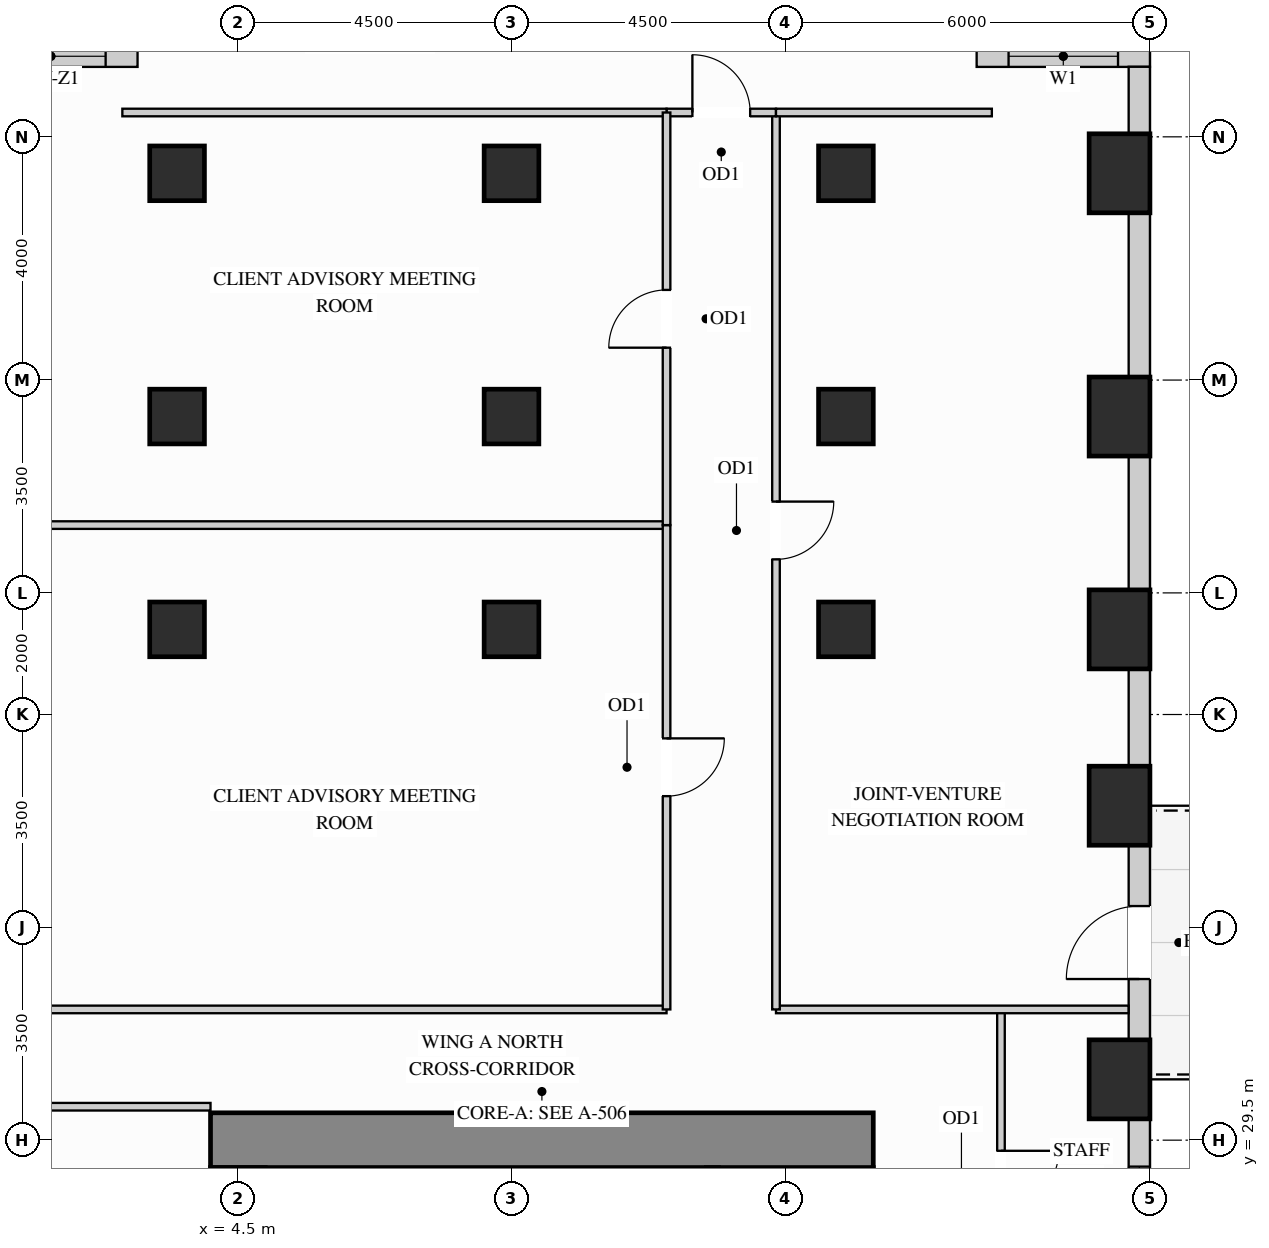
"""IFC4 building model, lengths in metres.
Left out: names, types, materials, properties, quantities, classifications, styles, units other than length and angle.
Written with IfcOpenShell. Run it as: python <this file> out.ifc"""

import sys

from ifc_helpers import new_model, si_unit, direction, frame, frame_2d, origin, origin_2d, place, context, subcontext, project, spatial, rectangle, extrude, source, transform, mapped, element, fill, save


model = new_model("IFC4")
c1 = context("Model", 3, precision=1e-05, world=origin(), true_north=direction((0.0, 1.0)))
c2 = subcontext(c1, "Body", "Model", "MODEL_VIEW")
j1 = project(units=[si_unit("LENGTHUNIT", "METRE"), si_unit("PLANEANGLEUNIT", "RADIAN")], contexts=[c1])
p1 = place(None, origin())
s1 = spatial("IfcSite", under=j1, at=p1, CompositionType="ELEMENT")
p2 = place(p1, origin())
s2 = spatial("IfcBuilding", under=s1, at=p2, CompositionType="ELEMENT")
p3 = place(p2, frame((0.0, 0.0, 40.5)))
s3 = spatial("IfcBuildingStorey", under=s2, at=p3, CompositionType="ELEMENT", Elevation=40.5)
m1 = source(origin(), c2, "Body", "SweptSolid", [
    extrude(rectangle(XDim=0.9, YDim=0.9, at=origin_2d()), origin(), (0.0, 0.0, 1.0), 3.38),
])
for number, where, z_axis, x_axis in (
    (1, (14.5, 37.9, 0.0), (0.0, 0.0, 1.0), (1.0, 0.0, 0.0)),
    (2, (14.5, 41.4, 0.0), (0.0, 0.0, 1.0), (1.0, 0.0, 0.0)),
    (3, (14.5, 45.4, 0.0), (0.0, 0.0, 1.0), (1.0, 0.0, 0.0)),
    (4, (3.5, 37.9, 0.0), (0.0, 0.0, 1.0), (1.0, 0.0, 0.0)),
    (5, (3.5, 41.4, 0.0), (0.0, 0.0, 1.0), (1.0, 0.0, 0.0)),
    (6, (3.5, 45.4, 0.0), (0.0, 0.0, 1.0), (1.0, 0.0, 0.0)),
    (7, (9.0, 37.9, 0.0), (0.0, 0.0, 1.0), (1.0, 0.0, 0.0)),
    (8, (9.0, 41.4, 0.0), (0.0, 0.0, 1.0), (1.0, 0.0, 0.0)),
    (9, (9.0, 45.4, 0.0), (0.0, 0.0, 1.0), (1.0, 0.0, 0.0)),
):
    element("IfcColumn", number, at=place(p3, frame(where, z_axis=z_axis, x_axis=x_axis)), inside=s3, PredefinedType="COLUMN", context=c2, shape_type="MappedRepresentation", body=[
        mapped(m1, transform((0.0, 0.0, 0.0), x_axis=(1.0, 0.0, 0.0), y_axis=(0.0, 1.0, 0.0), z_axis=(0.0, 0.0, 1.0))),
    ])
m2 = source(origin(), c2, "Body", "SweptSolid", [
    extrude(rectangle(XDim=1.0, YDim=1.3, at=origin_2d()), origin(), (0.0, 0.0, 1.0), 3.38),
])
for number, where, z_axis, x_axis in (
    (10, (19.0, 30.5, 0.0), (0.0, 0.0, 1.0), (1.0, 0.0, 0.0)),
    (11, (19.0, 35.0, 0.0), (0.0, 0.0, 1.0), (1.0, 0.0, 0.0)),
    (12, (19.0, 37.9, 0.0), (0.0, 0.0, 1.0), (1.0, 0.0, 0.0)),
    (13, (19.0, 41.4, 0.0), (0.0, 0.0, 1.0), (1.0, 0.0, 0.0)),
    (14, (19.0, 45.4, 0.0), (0.0, 0.0, 1.0), (1.0, 0.0, 0.0)),
):
    element("IfcColumn", number, at=place(p3, frame(where, z_axis=z_axis, x_axis=x_axis)), inside=s3, PredefinedType="COLUMN", context=c2, shape_type="MappedRepresentation", body=[
        mapped(m2, transform((0.0, 0.0, 0.0), x_axis=(1.0, 0.0, 0.0), y_axis=(0.0, 1.0, 0.0), z_axis=(0.0, 0.0, 1.0))),
    ])
m3 = source(origin(), c2, "Body", "SweptSolid", [
    extrude(rectangle(XDim=10.9, YDim=0.9, at=frame_2d((5.45, 0.0))), origin(), (0.0, 0.0, 1.0), 3.38),
])
p4 = place(p3, frame((4.05, 29.5, 0.0), z_axis=(0.0, 0.0, 1.0), x_axis=(1.0, 0.0, 0.0)))
e15 = element("IfcWall", 15, at=p4, inside=s3, PredefinedType="SHEAR", context=c2, shape_type="MappedRepresentation", body=[
    mapped(m3, transform((0.0, 0.0, 0.0), x_axis=(1.0, 0.0, 0.0), y_axis=(0.0, 1.0, 0.0), z_axis=(0.0, 0.0, 1.0))),
])
p5 = place(p3, frame((19.5, 47.325, 0.0), z_axis=(0.0, 0.0, 1.0), x_axis=(-1.0, 0.0, 0.0)))
e16 = element("IfcWall", 16, at=p5, inside=s3, PredefinedType="SOLIDWALL", context=c2, shape_type="SweptSolid", body=[
    extrude(rectangle(XDim=2.85, YDim=0.35, at=frame_2d((1.425, 0.0))), origin(), (0.0, 0.0, 1.0), 3.365),
])
p6 = place(p5, frame((0.525, 0.0, 0.78)))
e17 = element("IfcOpeningElement", 17, at=p6, cuts=e16, PredefinedType="OPENING", context=c2, shape_type="SweptSolid", body=[
    extrude(rectangle(XDim=1.8, YDim=2.1, at=frame_2d((0.9, 1.05))), frame((0.0, 0.185, 0.0), z_axis=(0.0, -1.0, 0.0), x_axis=(1.0, 0.0, 0.0)), (0.0, 0.0, 1.0), 0.37),
])
p7 = place(p3, frame((2.85, 47.325, 0.0), z_axis=(0.0, 0.0, 1.0), x_axis=(-1.0, 0.0, 0.0)))
e18 = element("IfcWall", 18, at=p7, inside=s3, PredefinedType="SOLIDWALL", context=c2, shape_type="SweptSolid", body=[
    extrude(rectangle(XDim=2.85, YDim=0.35, at=frame_2d((1.425, 0.0))), origin(), (0.0, 0.0, 1.0), 3.365),
])
p8 = place(p7, frame((0.525, 0.0, 0.78)))
e19 = element("IfcOpeningElement", 19, at=p8, cuts=e18, PredefinedType="OPENING", context=c2, shape_type="SweptSolid", body=[
    extrude(rectangle(XDim=1.8, YDim=2.1, at=frame_2d((0.9, 1.05))), frame((0.0, 0.185, 0.0), z_axis=(0.0, -1.0, 0.0), x_axis=(1.0, 0.0, 0.0)), (0.0, 0.0, 1.0), 0.37),
])
p9 = place(p3, frame((19.325, 27.448, 0.0), z_axis=(0.0, 0.0, 1.0), x_axis=(0.0, 1.0, 0.0)))
e20 = element("IfcWall", 20, at=p9, inside=s3, PredefinedType="SOLIDWALL", context=c2, shape_type="SweptSolid", body=[
    extrude(rectangle(XDim=2.404, YDim=0.35, at=frame_2d((1.202, 0.0))), origin(), (0.0, 0.0, 1.0), 2.51),
])
p10 = place(p9, frame((0.417, 0.0, 0.78)))
e21 = element("IfcOpeningElement", 21, at=p10, cuts=e20, PredefinedType="OPENING", context=c2, shape_type="SweptSolid", body=[
    extrude(rectangle(XDim=1.2, YDim=1.55, at=frame_2d((0.6, 0.775))), frame((0.0, 0.185, 0.0), z_axis=(0.0, -1.0, 0.0), x_axis=(1.0, 0.0, 0.0)), (0.0, 0.0, 1.0), 0.37),
])
p11 = place(p3, frame((19.325, 31.148, 0.0), z_axis=(0.0, 0.0, 1.0), x_axis=(0.0, 1.0, 0.0)))
e22 = element("IfcWall", 22, at=p11, inside=s3, PredefinedType="SOLIDWALL", context=c2, shape_type="SweptSolid", body=[
    extrude(rectangle(XDim=3.204, YDim=0.35, at=frame_2d((1.602, 0.0))), origin(), (0.0, 0.0, 1.0), 2.51),
])
p12 = place(p11, frame((1.002, 0.0, 0.0)))
e23 = element("IfcOpeningElement", 23, at=p12, cuts=e22, PredefinedType="OPENING", context=c2, shape_type="SweptSolid", body=[
    extrude(rectangle(XDim=1.2, YDim=2.15, at=frame_2d((0.6, 1.075))), frame((0.0, 0.185, 0.0), z_axis=(0.0, -1.0, 0.0), x_axis=(1.0, 0.0, 0.0)), (0.0, 0.0, 1.0), 0.37),
])
m4 = source(origin(), c2, "Body", "SweptSolid", [
    extrude(rectangle(XDim=1.604, YDim=0.35, at=frame_2d((0.802, 0.0))), origin(), (0.0, 0.0, 1.0), 2.51),
])
p13 = place(p3, frame((19.325, 35.648, 0.0), z_axis=(0.0, 0.0, 1.0), x_axis=(0.0, 1.0, 0.0)))
e24 = element("IfcWall", 24, at=p13, inside=s3, PredefinedType="SOLIDWALL", context=c2, shape_type="MappedRepresentation", body=[
    mapped(m4, transform((0.0, 0.0, 0.0), x_axis=(1.0, 0.0, 0.0), y_axis=(0.0, 1.0, 0.0), z_axis=(0.0, 0.0, 1.0))),
])
m5 = source(origin(), c2, "Body", "SweptSolid", [
    extrude(rectangle(XDim=2.204, YDim=0.35, at=frame_2d((1.102, 0.0))), origin(), (0.0, 0.0, 1.0), 2.51),
])
p14 = place(p3, frame((19.325, 38.548, 0.0), z_axis=(0.0, 0.0, 1.0), x_axis=(0.0, 1.0, 0.0)))
e25 = element("IfcWall", 25, at=p14, inside=s3, PredefinedType="SOLIDWALL", context=c2, shape_type="MappedRepresentation", body=[
    mapped(m5, transform((0.0, 0.0, 0.0), x_axis=(1.0, 0.0, 0.0), y_axis=(0.0, 1.0, 0.0), z_axis=(0.0, 0.0, 1.0))),
])
m6 = source(origin(), c2, "Body", "SweptSolid", [
    extrude(rectangle(XDim=2.704, YDim=0.35, at=frame_2d((1.352, 0.0))), origin(), (0.0, 0.0, 1.0), 2.51),
])
p15 = place(p3, frame((19.325, 42.048, 0.0), z_axis=(0.0, 0.0, 1.0), x_axis=(0.0, 1.0, 0.0)))
e26 = element("IfcWall", 26, at=p15, inside=s3, PredefinedType="SOLIDWALL", context=c2, shape_type="MappedRepresentation", body=[
    mapped(m6, transform((0.0, 0.0, 0.0), x_axis=(1.0, 0.0, 0.0), y_axis=(0.0, 1.0, 0.0), z_axis=(0.0, 0.0, 1.0))),
])
m7 = source(origin(), c2, "Body", "SweptSolid", [
    extrude(rectangle(XDim=1.104, YDim=0.35, at=frame_2d((0.552, 0.0))), origin(), (0.0, 0.0, 1.0), 3.365),
])
p16 = place(p3, frame((19.325, 46.048, 0.0), z_axis=(0.0, 0.0, 1.0), x_axis=(0.0, 1.0, 0.0)))
e27 = element("IfcWall", 27, at=p16, inside=s3, PredefinedType="SOLIDWALL", context=c2, shape_type="MappedRepresentation", body=[
    mapped(m7, transform((0.0, 0.0, 0.0), x_axis=(1.0, 0.0, 0.0), y_axis=(0.0, 1.0, 0.0), z_axis=(0.0, 0.0, 1.0))),
])
p17 = place(p3, frame((17.05, 26.05, 0.0), z_axis=(0.0, 0.0, 1.0), x_axis=(0.0, 1.0, 0.0)))
e28 = element("IfcWall", 28, at=p17, inside=s3, PredefinedType="PARTITIONING", context=c2, shape_type="SweptSolid", body=[
    extrude(rectangle(XDim=5.6, YDim=0.125, at=frame_2d((2.8, 0.0))), origin(), (0.0, 0.0, 1.0), 3.365),
])
p18 = place(p17, frame((2.325, 0.0, 0.0)))
e29 = element("IfcOpeningElement", 29, at=p18, cuts=e28, PredefinedType="OPENING", context=c2, shape_type="SweptSolid", body=[
    extrude(rectangle(XDim=0.95, YDim=2.15, at=frame_2d((0.475, 1.075))), frame((0.0, 0.073, 0.0), z_axis=(0.0, -1.0, 0.0), x_axis=(1.0, 0.0, 0.0)), (0.0, 0.0, 1.0), 0.145),
])
m8 = source(origin(), c2, "Body", "SweptSolid", [
    extrude(rectangle(XDim=5.798, YDim=0.125, at=frame_2d((2.899, 0.0))), origin(), (0.0, 0.0, 1.0), 2.828),
])
p19 = place(p3, frame((13.35, 31.65, 0.0), z_axis=(0.0, 0.0, 1.0), x_axis=(1.0, 0.0, 0.0)))
e30 = element("IfcWall", 30, at=p19, inside=s3, PredefinedType="PARTITIONING", context=c2, shape_type="MappedRepresentation", body=[
    mapped(m8, transform((0.0, 0.0, 0.0), x_axis=(1.0, 0.0, 0.0), y_axis=(0.0, 1.0, 0.0), z_axis=(0.0, 0.0, 1.0))),
])
m9 = source(origin(), c2, "Body", "SweptSolid", [
    extrude(rectangle(XDim=11.198, YDim=0.125, at=frame_2d((5.599, 0.0))), origin(), (0.0, 0.0, 1.0), 2.828),
])
for number, where, z_axis, x_axis in (
    (31, (0.352, 31.65, 0.0), (0.0, 0.0, 1.0), (1.0, 0.0, 0.0)),
    (32, (0.352, 39.615, 0.0), (0.0, 0.0, 1.0), (1.0, 0.0, 0.0)),
):
    element("IfcWall", number, at=place(p3, frame(where, z_axis=z_axis, x_axis=x_axis)), inside=s3, PredefinedType="PARTITIONING", context=c2, shape_type="MappedRepresentation", body=[
        mapped(m9, transform((0.0, 0.0, 0.0), x_axis=(1.0, 0.0, 0.0), y_axis=(0.0, 1.0, 0.0), z_axis=(0.0, 0.0, 1.0))),
    ])
m10 = source(origin(), c2, "Body", "SweptSolid", [
    extrude(rectangle(XDim=2.79, YDim=0.125, at=frame_2d((1.395, 0.0))), origin(), (0.0, 0.0, 1.0), 3.365),
])
p20 = place(p3, frame((1.26, 30.05, 0.0), z_axis=(0.0, 0.0, 1.0), x_axis=(1.0, 0.0, 0.0)))
e33 = element("IfcWall", 33, at=p20, inside=s3, PredefinedType="PARTITIONING", context=c2, shape_type="MappedRepresentation", body=[
    mapped(m10, transform((0.0, 0.0, 0.0), x_axis=(1.0, 0.0, 0.0), y_axis=(0.0, 1.0, 0.0), z_axis=(0.0, 0.0, 1.0))),
])
p21 = place(p3, frame((13.35, 31.65, 0.0), z_axis=(0.0, 0.0, 1.0), x_axis=(0.0, 1.0, 0.0)))
e34 = element("IfcWall", 34, at=p21, inside=s3, PredefinedType="PARTITIONING", context=c2, shape_type="SweptSolid", body=[
    extrude(rectangle(XDim=14.75, YDim=0.125, at=frame_2d((7.375, 0.0))), origin(), (0.0, 0.0, 1.0), 3.365),
])
p22 = place(p21, frame((7.402, 0.0, 0.0)))
e35 = element("IfcOpeningElement", 35, at=p22, cuts=e34, PredefinedType="OPENING", context=c2, shape_type="SweptSolid", body=[
    extrude(rectangle(XDim=0.95, YDim=2.15, at=frame_2d((0.475, 1.075))), frame((0.0, 0.073, 0.0), z_axis=(0.0, -1.0, 0.0), x_axis=(1.0, 0.0, 0.0)), (0.0, 0.0, 1.0), 0.145),
])
p23 = place(p3, frame((11.55, 46.4, 0.0), z_axis=(0.0, 0.0, 1.0), x_axis=(1.0, 0.0, 0.0)))
e36 = element("IfcWall", 36, at=p23, inside=s3, PredefinedType="PARTITIONING", context=c2, shape_type="SweptSolid", body=[
    extrude(rectangle(XDim=1.8, YDim=0.125, at=frame_2d((0.9, 0.0))), origin(), (0.0, 0.0, 1.0), 3.365),
])
p24 = place(p23, frame((0.425, 0.0, 0.0)))
e37 = element("IfcOpeningElement", 37, at=p24, cuts=e36, PredefinedType="OPENING", context=c2, shape_type="SweptSolid", body=[
    extrude(rectangle(XDim=0.95, YDim=2.15, at=frame_2d((0.475, 1.075))), frame((0.0, 0.073, 0.0), z_axis=(0.0, -1.0, 0.0), x_axis=(1.0, 0.0, 0.0)), (0.0, 0.0, 1.0), 0.145),
])
m11 = source(origin(), c2, "Body", "SweptSolid", [
    extrude(rectangle(XDim=3.55, YDim=0.125, at=frame_2d((1.775, 0.0))), origin(), (0.0, 0.0, 1.0), 3.365),
])
p25 = place(p3, frame((13.35, 46.4, 0.0), z_axis=(0.0, 0.0, 1.0), x_axis=(1.0, 0.0, 0.0)))
e38 = element("IfcWall", 38, at=p25, inside=s3, PredefinedType="PARTITIONING", context=c2, shape_type="MappedRepresentation", body=[
    mapped(m11, transform((0.0, 0.0, 0.0), x_axis=(1.0, 0.0, 0.0), y_axis=(0.0, 1.0, 0.0), z_axis=(0.0, 0.0, 1.0))),
])
m12 = source(origin(), c2, "Body", "SweptSolid", [
    extrude(rectangle(XDim=8.95, YDim=0.125, at=frame_2d((4.475, 0.0))), origin(), (0.0, 0.0, 1.0), 3.365),
])
p26 = place(p3, frame((2.6, 46.4, 0.0), z_axis=(0.0, 0.0, 1.0), x_axis=(1.0, 0.0, 0.0)))
e39 = element("IfcWall", 39, at=p26, inside=s3, PredefinedType="PARTITIONING", context=c2, shape_type="MappedRepresentation", body=[
    mapped(m12, transform((0.0, 0.0, 0.0), x_axis=(1.0, 0.0, 0.0), y_axis=(0.0, 1.0, 0.0), z_axis=(0.0, 0.0, 1.0))),
])
p27 = place(p3, frame((11.55, 31.65, 0.0), z_axis=(0.0, 0.0, 1.0), x_axis=(0.0, 1.0, 0.0)))
e40 = element("IfcWall", 40, at=p27, inside=s3, PredefinedType="PARTITIONING", context=c2, shape_type="SweptSolid", body=[
    extrude(rectangle(XDim=7.965, YDim=0.125, at=frame_2d((3.982, 0.0))), origin(), (0.0, 0.0, 1.0), 3.365),
])
p28 = place(p27, frame((3.508, 0.0, 0.0)))
e41 = element("IfcOpeningElement", 41, at=p28, cuts=e40, PredefinedType="OPENING", context=c2, shape_type="SweptSolid", body=[
    extrude(rectangle(XDim=0.95, YDim=2.15, at=frame_2d((0.475, 1.075))), frame((0.0, 0.073, 0.0), z_axis=(0.0, -1.0, 0.0), x_axis=(1.0, 0.0, 0.0)), (0.0, 0.0, 1.0), 0.145),
])
p29 = place(p3, frame((11.55, 39.615, 0.0), z_axis=(0.0, 0.0, 1.0), x_axis=(0.0, 1.0, 0.0)))
e42 = element("IfcWall", 42, at=p29, inside=s3, PredefinedType="PARTITIONING", context=c2, shape_type="SweptSolid", body=[
    extrude(rectangle(XDim=6.785, YDim=0.125, at=frame_2d((3.393, 0.0))), origin(), (0.0, 0.0, 1.0), 3.365),
])
p30 = place(p29, frame((2.917, 0.0, 0.0)))
e43 = element("IfcOpeningElement", 43, at=p30, cuts=e42, PredefinedType="OPENING", context=c2, shape_type="SweptSolid", body=[
    extrude(rectangle(XDim=0.95, YDim=2.15, at=frame_2d((0.475, 1.075))), frame((0.0, 0.073, 0.0), z_axis=(0.0, -1.0, 0.0), x_axis=(1.0, 0.0, 0.0)), (0.0, 0.0, 1.0), 0.145),
])
m13 = source(origin(), c2, "Body", "SweptSolid", [
    extrude(rectangle(XDim=1.2, YDim=2.15, at=frame_2d((0.6, 1.075))), frame((0.0, 0.025, 0.0), z_axis=(0.0, -1.0, 0.0), x_axis=(1.0, 0.0, 0.0)), (0.0, 0.0, 1.0), 0.05),
])
p31 = place(p12, frame((1.2, 0.0, 0.0), z_axis=(0.0, 0.0, 1.0), x_axis=(-1.0, 0.0, 0.0)))
e44 = element("IfcDoor", 44, at=p31, inside=s3, OperationType="SINGLE_SWING_LEFT", PredefinedType="DOOR", context=c2, shape_type="MappedRepresentation", body=[
    mapped(m13, transform((0.0, 0.0, 0.0), x_axis=(1.0, 0.0, 0.0), y_axis=(0.0, 1.0, 0.0), z_axis=(0.0, 0.0, 1.0))),
])
fill(e23, e44)
m14 = source(origin(), c2, "Body", "SweptSolid", [
    extrude(rectangle(XDim=0.95, YDim=2.15, at=frame_2d((0.475, 1.075))), frame((0.0, 0.025, 0.0), z_axis=(0.0, -1.0, 0.0), x_axis=(1.0, 0.0, 0.0)), (0.0, 0.0, 1.0), 0.05),
])
p32 = place(p18, origin())
e45 = element("IfcDoor", 45, at=p32, inside=s3, OperationType="SINGLE_SWING_RIGHT", PredefinedType="DOOR", context=c2, shape_type="MappedRepresentation", body=[
    mapped(m14, transform((0.0, 0.0, 0.0), x_axis=(1.0, 0.0, 0.0), y_axis=(0.0, 1.0, 0.0), z_axis=(0.0, 0.0, 1.0))),
])
fill(e29, e45)
p33 = place(p22, origin())
e46 = element("IfcDoor", 46, at=p33, inside=s3, OperationType="SINGLE_SWING_RIGHT", PredefinedType="DOOR", context=c2, shape_type="MappedRepresentation", body=[
    mapped(m14, transform((0.0, 0.0, 0.0), x_axis=(1.0, 0.0, 0.0), y_axis=(0.0, 1.0, 0.0), z_axis=(0.0, 0.0, 1.0))),
])
fill(e35, e46)
p34 = place(p24, origin())
e47 = element("IfcDoor", 47, at=p34, inside=s3, OperationType="SINGLE_SWING_LEFT", PredefinedType="DOOR", context=c2, shape_type="MappedRepresentation", body=[
    mapped(m14, transform((0.0, 0.0, 0.0), x_axis=(1.0, 0.0, 0.0), y_axis=(0.0, 1.0, 0.0), z_axis=(0.0, 0.0, 1.0))),
])
fill(e37, e47)
p35 = place(p28, origin())
e48 = element("IfcDoor", 48, at=p35, inside=s3, OperationType="SINGLE_SWING_RIGHT", PredefinedType="DOOR", context=c2, shape_type="MappedRepresentation", body=[
    mapped(m14, transform((0.0, 0.0, 0.0), x_axis=(1.0, 0.0, 0.0), y_axis=(0.0, 1.0, 0.0), z_axis=(0.0, 0.0, 1.0))),
])
fill(e41, e48)
p36 = place(p30, origin())
e49 = element("IfcDoor", 49, at=p36, inside=s3, OperationType="SINGLE_SWING_LEFT", PredefinedType="DOOR", context=c2, shape_type="MappedRepresentation", body=[
    mapped(m14, transform((0.0, 0.0, 0.0), x_axis=(1.0, 0.0, 0.0), y_axis=(0.0, 1.0, 0.0), z_axis=(0.0, 0.0, 1.0))),
])
fill(e43, e49)
m15 = source(origin(), c2, "Body", "SweptSolid", [
    extrude(rectangle(XDim=1.8, YDim=2.1, at=frame_2d((0.9, 1.05))), frame((0.0, 0.03, 0.0), z_axis=(0.0, -1.0, 0.0), x_axis=(1.0, 0.0, 0.0)), (0.0, 0.0, 1.0), 0.06),
])
p37 = place(p6, origin())
e50 = element("IfcWindow", 50, at=p37, inside=s3, PartitioningType="SINGLE_PANEL", PredefinedType="WINDOW", context=c2, shape_type="MappedRepresentation", body=[
    mapped(m15, transform((0.0, 0.0, 0.0), x_axis=(1.0, 0.0, 0.0), y_axis=(0.0, 1.0, 0.0), z_axis=(0.0, 0.0, 1.0))),
])
fill(e17, e50)
p38 = place(p8, origin())
e51 = element("IfcWindow", 51, at=p38, inside=s3, PartitioningType="SINGLE_PANEL", PredefinedType="WINDOW", context=c2, shape_type="MappedRepresentation", body=[
    mapped(m15, transform((0.0, 0.0, 0.0), x_axis=(1.0, 0.0, 0.0), y_axis=(0.0, 1.0, 0.0), z_axis=(0.0, 0.0, 1.0))),
])
fill(e19, e51)
m16 = source(origin(), c2, "Body", "SweptSolid", [
    extrude(rectangle(XDim=1.2, YDim=1.55, at=frame_2d((0.6, 0.775))), frame((0.0, 0.03, 0.0), z_axis=(0.0, -1.0, 0.0), x_axis=(1.0, 0.0, 0.0)), (0.0, 0.0, 1.0), 0.06),
])
p39 = place(p10, origin())
e52 = element("IfcWindow", 52, at=p39, inside=s3, PartitioningType="SINGLE_PANEL", PredefinedType="WINDOW", context=c2, shape_type="MappedRepresentation", body=[
    mapped(m16, transform((0.0, 0.0, 0.0), x_axis=(1.0, 0.0, 0.0), y_axis=(0.0, 1.0, 0.0), z_axis=(0.0, 0.0, 1.0))),
])
fill(e21, e52)
save(model, sys.argv[1])
